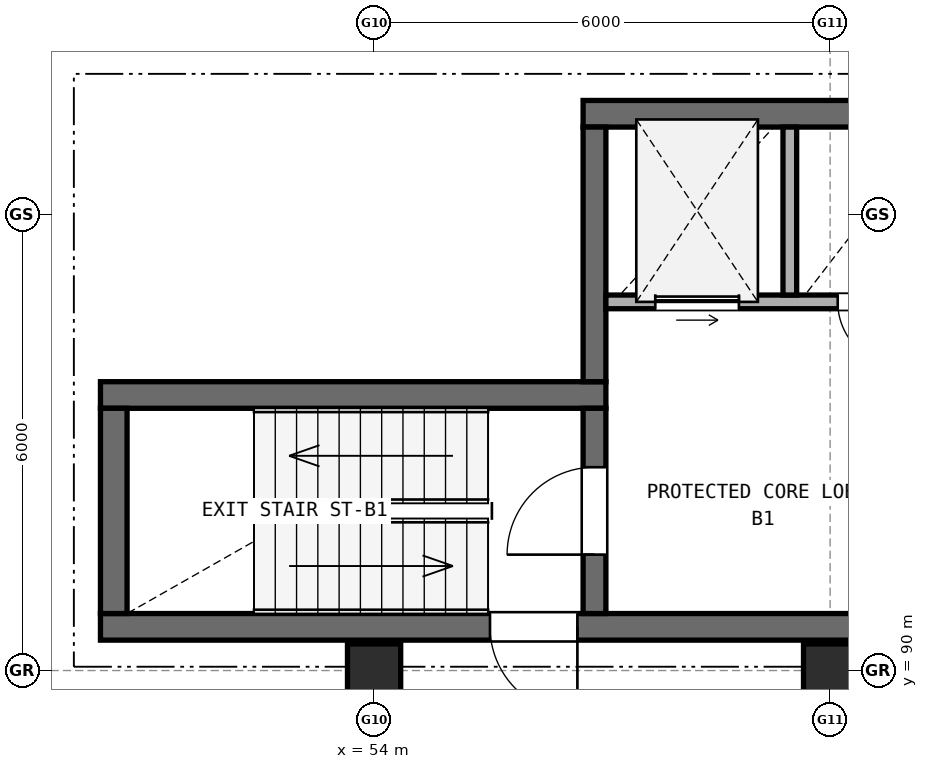
"""IFC4 building model, lengths in metres.
Left out: names, types, materials, properties, quantities, classifications, styles, units other than length and angle.
Written with IfcOpenShell. Run it as: python <this file> out.ifc"""

import sys

from ifc_helpers import new_model, si_unit, direction, frame, frame_2d, origin, origin_2d, place, context, subcontext, project, spatial, rectangle, extrude, element, fill, save


model = new_model("IFC4")
c1 = context("Model", 3, precision=1e-05, world=origin(), true_north=direction((0.0, 1.0)))
c2 = subcontext(c1, "Body", "Model", "MODEL_VIEW")
j1 = project(units=[si_unit("LENGTHUNIT", "METRE"), si_unit("PLANEANGLEUNIT", "RADIAN")], contexts=[c1])
p1 = place(None, origin())
s1 = spatial("IfcSite", under=j1, at=p1, CompositionType="ELEMENT")
p2 = place(p1, origin())
s2 = spatial("IfcBuilding", under=s1, at=p2, CompositionType="ELEMENT")
p3 = place(p2, origin())
s3 = spatial("IfcBuildingStorey", under=s2, at=p3, CompositionType="ELEMENT", Elevation=0.0)
for number, where, z_axis, x_axis in (
    (1, (54.0, 90.0, 0.0), (0.0, 0.0, 1.0), (1.0, 0.0, 0.0)),
    (2, (60.0, 90.0, 0.0), (0.0, 0.0, 1.0), (1.0, 0.0, 0.0)),
):
    element("IfcColumn", number, at=place(p3, frame(where, z_axis=z_axis, x_axis=x_axis)), inside=s3, PredefinedType="COLUMN", context=c2, shape_type="SweptSolid", body=[
        extrude(rectangle(XDim=0.7, YDim=0.7, at=origin_2d()), origin(), (0.0, 0.0, 1.0), 4.23),
    ])
p4 = place(p3, frame((50.4, 90.575, 0.0), z_axis=(0.0, 0.0, 1.0), x_axis=(1.0, 0.0, 0.0)))
e3 = element("IfcWall", 3, at=p4, inside=s3, PredefinedType="SHEAR", context=c2, shape_type="SweptSolid", body=[
    extrude(rectangle(XDim=11.4, YDim=0.35, at=frame_2d((5.7, 0.0))), origin(), (0.0, 0.0, 1.0), 4.23),
])
p5 = place(p4, frame((5.125, 0.0, 0.0)))
e4 = element("IfcOpeningElement", 4, at=p5, cuts=e3, PredefinedType="OPENING", context=c2, shape_type="SweptSolid", body=[
    extrude(rectangle(XDim=1.15, YDim=2.15, at=frame_2d((0.575, 1.075))), frame((0.0, 0.185, 0.0), z_axis=(0.0, -1.0, 0.0), x_axis=(1.0, 0.0, 0.0)), (0.0, 0.0, 1.0), 0.37),
])
p6 = place(p3, frame((57.05, 93.625, 0.0), z_axis=(0.0, 0.0, 1.0), x_axis=(-1.0, 0.0, 0.0)))
e5 = element("IfcWall", 5, at=p6, inside=s3, PredefinedType="SHEAR", context=c2, shape_type="SweptSolid", body=[
    extrude(rectangle(XDim=6.65, YDim=0.35, at=frame_2d((3.325, 0.0))), origin(), (0.0, 0.0, 1.0), 4.23),
])
p7 = place(p3, frame((50.575, 93.45, 0.0), z_axis=(0.0, 0.0, 1.0), x_axis=(0.0, -1.0, 0.0)))
e6 = element("IfcWall", 6, at=p7, inside=s3, PredefinedType="SHEAR", context=c2, shape_type="SweptSolid", body=[
    extrude(rectangle(XDim=2.7, YDim=0.35, at=frame_2d((1.35, 0.0))), origin(), (0.0, 0.0, 1.0), 4.23),
])
p8 = place(p3, frame((56.9, 90.75, 0.0), z_axis=(0.0, 0.0, 1.0), x_axis=(0.0, 1.0, 0.0)))
e7 = element("IfcWall", 7, at=p8, inside=s3, PredefinedType="SHEAR", context=c2, shape_type="SweptSolid", body=[
    extrude(rectangle(XDim=2.7, YDim=0.3, at=frame_2d((1.35, 0.0))), origin(), (0.0, 0.0, 1.0), 4.23),
])
p9 = place(p8, frame((0.775, 0.0, 0.0)))
e8 = element("IfcOpeningElement", 8, at=p9, cuts=e7, PredefinedType="OPENING", context=c2, shape_type="SweptSolid", body=[
    extrude(rectangle(XDim=1.15, YDim=2.15, at=frame_2d((0.575, 1.075))), frame((0.0, 0.16, 0.0), z_axis=(0.0, -1.0, 0.0), x_axis=(1.0, 0.0, 0.0)), (0.0, 0.0, 1.0), 0.32),
])
p10 = place(p3, frame((61.8, 97.325, 0.0), z_axis=(0.0, 0.0, 1.0), x_axis=(-1.0, 0.0, 0.0)))
e9 = element("IfcWall", 9, at=p10, inside=s3, PredefinedType="SHEAR", context=c2, shape_type="SweptSolid", body=[
    extrude(rectangle(XDim=5.05, YDim=0.35, at=frame_2d((2.525, 0.0))), origin(), (0.0, 0.0, 1.0), 4.23),
])
p11 = place(p3, frame((56.9, 93.8, 0.0), z_axis=(0.0, 0.0, 1.0), x_axis=(0.0, 1.0, 0.0)))
e10 = element("IfcWall", 10, at=p11, inside=s3, PredefinedType="SHEAR", context=c2, shape_type="SweptSolid", body=[
    extrude(rectangle(XDim=3.35, YDim=0.3, at=frame_2d((1.675, 0.0))), origin(), (0.0, 0.0, 1.0), 4.23),
])
p12 = place(p3, frame((57.05, 94.85, 0.0), z_axis=(0.0, 0.0, 1.0), x_axis=(1.0, 0.0, 0.0)))
e11 = element("IfcWall", 11, at=p12, inside=s3, PredefinedType="SOLIDWALL", context=c2, shape_type="SweptSolid", body=[
    extrude(rectangle(XDim=4.4, YDim=0.18, at=frame_2d((2.2, 0.0))), origin(), (0.0, 0.0, 1.0), 4.23),
])
p13 = place(p12, frame((0.65, 0.0, 0.0)))
e12 = element("IfcOpeningElement", 12, at=p13, cuts=e11, PredefinedType="OPENING", context=c2, shape_type="SweptSolid", body=[
    extrude(rectangle(XDim=1.1, YDim=2.15, at=frame_2d((0.55, 1.075))), frame((0.0, 0.1, 0.0), z_axis=(0.0, -1.0, 0.0), x_axis=(1.0, 0.0, 0.0)), (0.0, 0.0, 1.0), 0.2),
])
p14 = place(p12, frame((3.05, 0.0, 0.0)))
e13 = element("IfcOpeningElement", 13, at=p14, cuts=e11, PredefinedType="OPENING", context=c2, shape_type="SweptSolid", body=[
    extrude(rectangle(XDim=0.85, YDim=2.1, at=frame_2d((0.425, 1.05))), frame((0.0, 0.1, 0.0), z_axis=(0.0, -1.0, 0.0), x_axis=(1.0, 0.0, 0.0)), (0.0, 0.0, 1.0), 0.2),
])
p15 = place(p3, frame((59.47, 94.94, 0.0), z_axis=(0.0, 0.0, 1.0), x_axis=(0.0, 1.0, 0.0)))
e14 = element("IfcWall", 14, at=p15, inside=s3, PredefinedType="SOLIDWALL", context=c2, shape_type="SweptSolid", body=[
    extrude(rectangle(XDim=2.21, YDim=0.18, at=frame_2d((1.105, 0.0))), origin(), (0.0, 0.0, 1.0), 4.23),
])
p16 = place(p5, origin())
e15 = element("IfcDoor", 15, at=p16, inside=s3, OperationType="SINGLE_SWING_RIGHT", PredefinedType="DOOR", context=c2, shape_type="SweptSolid", body=[
    extrude(rectangle(XDim=1.15, YDim=2.15, at=frame_2d((0.575, 1.075))), frame((0.0, 0.025, 0.0), z_axis=(0.0, -1.0, 0.0), x_axis=(1.0, 0.0, 0.0)), (0.0, 0.0, 1.0), 0.05),
])
fill(e4, e15)
p17 = place(p9, origin())
e16 = element("IfcDoor", 16, at=p17, inside=s3, OperationType="SINGLE_SWING_LEFT", PredefinedType="DOOR", context=c2, shape_type="SweptSolid", body=[
    extrude(rectangle(XDim=1.15, YDim=2.15, at=frame_2d((0.575, 1.075))), frame((0.0, 0.025, 0.0), z_axis=(0.0, -1.0, 0.0), x_axis=(1.0, 0.0, 0.0)), (0.0, 0.0, 1.0), 0.05),
])
fill(e8, e16)
p18 = place(p13, origin())
e17 = element("IfcDoor", 17, at=p18, inside=s3, OperationType="SLIDING_TO_LEFT", PredefinedType="DOOR", context=c2, shape_type="SweptSolid", body=[
    extrude(rectangle(XDim=1.1, YDim=2.15, at=frame_2d((0.55, 1.075))), frame((0.0, 0.025, 0.0), z_axis=(0.0, -1.0, 0.0), x_axis=(1.0, 0.0, 0.0)), (0.0, 0.0, 1.0), 0.05),
])
fill(e12, e17)
p19 = place(p14, frame((0.85, 0.0, 0.0), z_axis=(0.0, 0.0, 1.0), x_axis=(-1.0, 0.0, 0.0)))
e18 = element("IfcDoor", 18, at=p19, inside=s3, OperationType="SINGLE_SWING_RIGHT", PredefinedType="DOOR", context=c2, shape_type="SweptSolid", body=[
    extrude(rectangle(XDim=0.85, YDim=2.1, at=frame_2d((0.425, 1.05))), frame((0.0, 0.025, 0.0), z_axis=(0.0, -1.0, 0.0), x_axis=(1.0, 0.0, 0.0)), (0.0, 0.0, 1.0), 0.05),
])
fill(e13, e18)
save(model, sys.argv[1])
